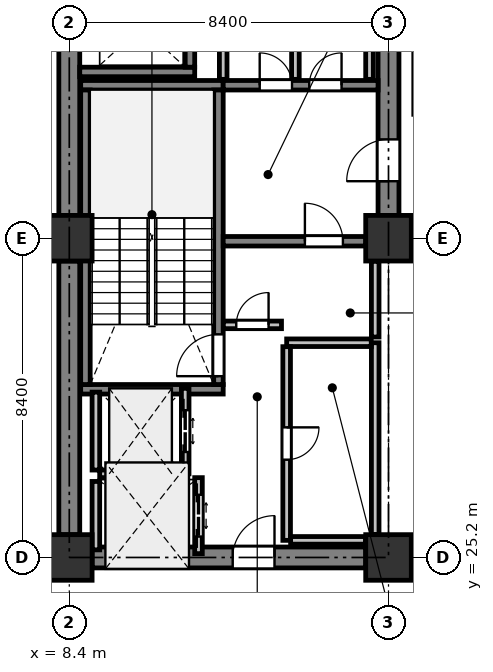
"""IFC4 building model, lengths in metres.
Left out: names, types, materials, properties, quantities, classifications, styles, units other than length and angle.
Written with IfcOpenShell. Run it as: python <this file> out.ifc"""

import sys

from ifc_helpers import new_model, si_unit, direction, frame, frame_2d, origin, origin_2d, place, context, subcontext, project, spatial, rectangle, extrude, element, fill, save


model = new_model("IFC4")
c1 = context("Model", 3, precision=1e-05, world=origin(), true_north=direction((0.0, 1.0)))
c2 = subcontext(c1, "Body", "Model", "MODEL_VIEW")
j1 = project(units=[si_unit("LENGTHUNIT", "METRE"), si_unit("PLANEANGLEUNIT", "RADIAN")], contexts=[c1])
p1 = place(None, origin())
s1 = spatial("IfcSite", under=j1, at=p1, CompositionType="ELEMENT")
p2 = place(p1, origin())
s2 = spatial("IfcBuilding", under=s1, at=p2, CompositionType="ELEMENT")
p3 = place(p2, frame((0.0, 0.0, 129.5)))
s3 = spatial("IfcBuildingStorey", under=s2, at=p3, CompositionType="ELEMENT", Elevation=129.5)
for number, where, z_axis, x_axis in (
    (1, (8.4, 25.2, 0.0), (0.0, 0.0, 1.0), (1.0, 0.0, 0.0)),
    (2, (8.4, 33.6, 0.0), (0.0, 0.0, 1.0), (1.0, 0.0, 0.0)),
    (3, (16.8, 25.2, 0.0), (0.0, 0.0, 1.0), (1.0, 0.0, 0.0)),
    (4, (16.8, 33.6, 0.0), (0.0, 0.0, 1.0), (1.0, 0.0, 0.0)),
):
    element("IfcColumn", number, at=place(p3, frame(where, z_axis=z_axis, x_axis=x_axis)), inside=s3, PredefinedType="COLUMN", context=c2, shape_type="SweptSolid", body=[
        extrude(rectangle(XDim=1.2, YDim=1.2, at=origin_2d()), origin(), (0.0, 0.0, 1.0), 4.1),
    ])
for number, where, z_axis, x_axis in (
    (5, (8.4, 25.8, 0.0), (0.0, 0.0, 1.0), (0.0, 1.0, 0.0)),
    (6, (8.4, 34.2, 0.0), (0.0, 0.0, 1.0), (0.0, 1.0, 0.0)),
):
    element("IfcWall", number, at=place(p3, frame(where, z_axis=z_axis, x_axis=x_axis)), inside=s3, PredefinedType="SHEAR", context=c2, shape_type="SweptSolid", body=[
        extrude(rectangle(XDim=7.2, YDim=0.55, at=frame_2d((3.6, 0.0))), origin(), (0.0, 0.0, 1.0), 3.825),
    ])
p4 = place(p3, frame((16.8, 34.2, 0.0), z_axis=(0.0, 0.0, 1.0), x_axis=(0.0, 1.0, 0.0)))
e7 = element("IfcWall", 7, at=p4, inside=s3, PredefinedType="SHEAR", context=c2, shape_type="SweptSolid", body=[
    extrude(rectangle(XDim=7.2, YDim=0.55, at=frame_2d((3.6, 0.0))), origin(), (0.0, 0.0, 1.0), 3.825),
])
p5 = place(p4, frame((0.9, 0.0, 0.0)))
e8 = element("IfcOpeningElement", 8, at=p5, cuts=e7, PredefinedType="OPENING", context=c2, shape_type="SweptSolid", body=[
    extrude(rectangle(XDim=1.1, YDim=2.15, at=frame_2d((0.55, 1.075))), frame((0.0, 0.285, 0.0), z_axis=(0.0, -1.0, 0.0), x_axis=(1.0, 0.0, 0.0)), (0.0, 0.0, 1.0), 0.57),
])
p6 = place(p3, frame((9.0, 25.2, 0.0), z_axis=(0.0, 0.0, 1.0), x_axis=(1.0, 0.0, 0.0)))
e9 = element("IfcWall", 9, at=p6, inside=s3, PredefinedType="SHEAR", context=c2, shape_type="SweptSolid", body=[
    extrude(rectangle(XDim=7.2, YDim=0.55, at=frame_2d((3.6, 0.0))), origin(), (0.0, 0.0, 1.0), 3.825),
])
p7 = place(p6, frame((3.7, 0.0, 0.0)))
e10 = element("IfcOpeningElement", 10, at=p7, cuts=e9, PredefinedType="OPENING", context=c2, shape_type="SweptSolid", body=[
    extrude(rectangle(XDim=1.1, YDim=2.15, at=frame_2d((0.55, 1.075))), frame((0.0, 0.285, 0.0), z_axis=(0.0, -1.0, 0.0), x_axis=(1.0, 0.0, 0.0)), (0.0, 0.0, 1.0), 0.57),
])
for number, where, z_axis, x_axis in (
    (11, (12.45, 29.625, 0.0), (0.0, 0.0, 1.0), (-1.0, 0.0, 0.0)),
    (12, (12.45, 37.625, 0.0), (0.0, 0.0, 1.0), (-1.0, 0.0, 0.0)),
):
    element("IfcWall", number, at=place(p3, frame(where, z_axis=z_axis, x_axis=x_axis)), inside=s3, PredefinedType="SHEAR", context=c2, shape_type="SweptSolid", body=[
        extrude(rectangle(XDim=3.75, YDim=0.25, at=frame_2d((1.875, 0.0))), origin(), (0.0, 0.0, 1.0), 3.825),
    ])
p8 = place(p3, frame((12.325, 29.75, 0.0), z_axis=(0.0, 0.0, 1.0), x_axis=(0.0, 1.0, 0.0)))
e13 = element("IfcWall", 13, at=p8, inside=s3, PredefinedType="SHEAR", context=c2, shape_type="SweptSolid", body=[
    extrude(rectangle(XDim=7.75, YDim=0.25, at=frame_2d((3.875, 0.0))), origin(), (0.0, 0.0, 1.0), 3.825),
])
p9 = place(p8, frame((0.22, 0.0, 0.0)))
e14 = element("IfcOpeningElement", 14, at=p9, cuts=e13, PredefinedType="OPENING", context=c2, shape_type="SweptSolid", body=[
    extrude(rectangle(XDim=1.1, YDim=2.15, at=frame_2d((0.55, 1.075))), frame((0.0, 0.135, 0.0), z_axis=(0.0, -1.0, 0.0), x_axis=(1.0, 0.0, 0.0)), (0.0, 0.0, 1.0), 0.27),
])
p10 = place(p3, frame((8.825, 29.75, 0.0), z_axis=(0.0, 0.0, 1.0), x_axis=(0.0, 1.0, 0.0)))
e15 = element("IfcWall", 15, at=p10, inside=s3, PredefinedType="SHEAR", context=c2, shape_type="SweptSolid", body=[
    extrude(rectangle(XDim=7.75, YDim=0.25, at=frame_2d((3.875, 0.0))), origin(), (0.0, 0.0, 1.0), 3.825),
])
p11 = place(p3, frame((8.675, 37.975, 0.0), z_axis=(0.0, 0.0, 1.0), x_axis=(1.0, 0.0, 0.0)))
e16 = element("IfcWall", 16, at=p11, inside=s3, PredefinedType="SHEAR", context=c2, shape_type="SweptSolid", body=[
    extrude(rectangle(XDim=3.025, YDim=0.25, at=frame_2d((1.512, 0.0))), origin(), (0.0, 0.0, 1.0), 3.825),
])
p12 = place(p3, frame((11.575, 38.1, 0.0), z_axis=(0.0, 0.0, 1.0), x_axis=(0.0, 1.0, 0.0)))
e17 = element("IfcWall", 17, at=p12, inside=s3, PredefinedType="SHEAR", context=c2, shape_type="SweptSolid", body=[
    extrude(rectangle(XDim=2.55, YDim=0.25, at=frame_2d((1.275, 0.0))), origin(), (0.0, 0.0, 1.0), 3.825),
])
p13 = place(p3, frame((12.45, 33.52, 0.0), z_axis=(0.0, 0.0, 1.0), x_axis=(1.0, 0.0, 0.0)))
e18 = element("IfcWall", 18, at=p13, inside=s3, PredefinedType="SHEAR", context=c2, shape_type="SweptSolid", body=[
    extrude(rectangle(XDim=3.75, YDim=0.25, at=frame_2d((1.875, 0.0))), origin(), (0.0, 0.0, 1.0), 3.825),
])
p14 = place(p13, frame((2.15, 0.0, 0.0)))
e19 = element("IfcOpeningElement", 19, at=p14, cuts=e18, PredefinedType="OPENING", context=c2, shape_type="SweptSolid", body=[
    extrude(rectangle(XDim=1.0, YDim=2.15, at=frame_2d((0.5, 1.075))), frame((0.0, 0.135, 0.0), z_axis=(0.0, -1.0, 0.0), x_axis=(1.0, 0.0, 0.0)), (0.0, 0.0, 1.0), 0.27),
])
p15 = place(p3, frame((12.45, 37.625, 0.0), z_axis=(0.0, 0.0, 1.0), x_axis=(1.0, 0.0, 0.0)))
e20 = element("IfcWall", 20, at=p15, inside=s3, PredefinedType="SHEAR", context=c2, shape_type="SweptSolid", body=[
    extrude(rectangle(XDim=4.075, YDim=0.25, at=frame_2d((2.038, 0.0))), origin(), (0.0, 0.0, 1.0), 3.825),
])
p16 = place(p15, frame((0.96, 0.0, 0.0)))
e21 = element("IfcOpeningElement", 21, at=p16, cuts=e20, PredefinedType="OPENING", context=c2, shape_type="SweptSolid", body=[
    extrude(rectangle(XDim=0.85, YDim=2.15, at=frame_2d((0.425, 1.075))), frame((0.0, 0.135, 0.0), z_axis=(0.0, -1.0, 0.0), x_axis=(1.0, 0.0, 0.0)), (0.0, 0.0, 1.0), 0.27),
])
p17 = place(p15, frame((2.264, 0.0, 0.0)))
e22 = element("IfcOpeningElement", 22, at=p17, cuts=e20, PredefinedType="OPENING", context=c2, shape_type="SweptSolid", body=[
    extrude(rectangle(XDim=0.85, YDim=2.15, at=frame_2d((0.425, 1.075))), frame((0.0, 0.135, 0.0), z_axis=(0.0, -1.0, 0.0), x_axis=(1.0, 0.0, 0.0)), (0.0, 0.0, 1.0), 0.27),
])
p18 = place(p3, frame((11.45, 27.4, 0.0), z_axis=(0.0, 0.0, 1.0), x_axis=(0.0, 1.0, 0.0)))
e23 = element("IfcWall", 23, at=p18, inside=s3, PredefinedType="PARTITIONING", context=c2, shape_type="SweptSolid", body=[
    extrude(rectangle(XDim=2.25, YDim=0.2, at=frame_2d((1.125, 0.0))), origin(), (0.0, 0.0, 1.0), 3.825),
])
p19 = place(p18, frame((0.575, 0.0, 0.0)))
e24 = element("IfcOpeningElement", 24, at=p19, cuts=e23, PredefinedType="OPENING", context=c2, shape_type="SweptSolid", body=[
    extrude(rectangle(XDim=1.1, YDim=2.2, at=frame_2d((0.55, 1.1))), frame((0.0, 0.11, 0.0), z_axis=(0.0, -1.0, 0.0), x_axis=(1.0, 0.0, 0.0)), (0.0, 0.0, 1.0), 0.22),
])
p20 = place(p3, frame((9.1, 27.5, 0.0), z_axis=(0.0, 0.0, 1.0), x_axis=(0.0, 1.0, 0.0)))
e25 = element("IfcWall", 25, at=p20, inside=s3, PredefinedType="PARTITIONING", context=c2, shape_type="SweptSolid", body=[
    extrude(rectangle(XDim=2.05, YDim=0.2, at=frame_2d((1.025, 0.0))), origin(), (0.0, 0.0, 1.0), 3.825),
])
p21 = place(p3, frame((9.2, 27.4, 0.0), z_axis=(0.0, 0.0, 1.0), x_axis=(1.0, 0.0, 0.0)))
e26 = element("IfcWall", 26, at=p21, inside=s3, PredefinedType="PARTITIONING", context=c2, shape_type="SweptSolid", body=[
    extrude(rectangle(XDim=2.15, YDim=0.2, at=frame_2d((1.075, 0.0))), origin(), (0.0, 0.0, 1.0), 3.825),
])
p22 = place(p3, frame((11.8, 25.3, 0.0), z_axis=(0.0, 0.0, 1.0), x_axis=(0.0, 1.0, 0.0)))
e27 = element("IfcWall", 27, at=p22, inside=s3, PredefinedType="PARTITIONING", context=c2, shape_type="SweptSolid", body=[
    extrude(rectangle(XDim=2.0, YDim=0.2, at=frame_2d((1.0, 0.0))), origin(), (0.0, 0.0, 1.0), 3.825),
])
p23 = place(p22, frame((0.45, 0.0, 0.0)))
e28 = element("IfcOpeningElement", 28, at=p23, cuts=e27, PredefinedType="OPENING", context=c2, shape_type="SweptSolid", body=[
    extrude(rectangle(XDim=1.1, YDim=2.2, at=frame_2d((0.55, 1.1))), frame((0.0, 0.11, 0.0), z_axis=(0.0, -1.0, 0.0), x_axis=(1.0, 0.0, 0.0)), (0.0, 0.0, 1.0), 0.22),
])
p24 = place(p3, frame((9.1, 25.4, 0.0), z_axis=(0.0, 0.0, 1.0), x_axis=(0.0, 1.0, 0.0)))
e29 = element("IfcWall", 29, at=p24, inside=s3, PredefinedType="PARTITIONING", context=c2, shape_type="SweptSolid", body=[
    extrude(rectangle(XDim=1.8, YDim=0.2, at=frame_2d((0.9, 0.0))), origin(), (0.0, 0.0, 1.0), 3.825),
])
p25 = place(p3, frame((16.45, 25.805, 0.0), z_axis=(0.0, 0.0, 1.0), x_axis=(0.0, 1.0, 0.0)))
e30 = element("IfcWall", 30, at=p25, inside=s3, PredefinedType="PARTITIONING", context=c2, shape_type="SweptSolid", body=[
    extrude(rectangle(XDim=5.045, YDim=0.2, at=frame_2d((2.522, 0.0))), origin(), (0.0, 0.0, 1.0), 3.825),
])
p26 = place(p3, frame((16.346, 30.85, 0.0), z_axis=(0.0, 0.0, 1.0), x_axis=(-1.0, 0.0, 0.0)))
e31 = element("IfcWall", 31, at=p26, inside=s3, PredefinedType="PARTITIONING", context=c2, shape_type="SweptSolid", body=[
    extrude(rectangle(XDim=2.226, YDim=0.2, at=frame_2d((1.113, 0.0))), origin(), (0.0, 0.0, 1.0), 3.825),
])
p27 = place(p3, frame((14.12, 30.746, 0.0), z_axis=(0.0, 0.0, 1.0), x_axis=(0.0, -1.0, 0.0)))
e32 = element("IfcWall", 32, at=p27, inside=s3, PredefinedType="PARTITIONING", context=c2, shape_type="SweptSolid", body=[
    extrude(rectangle(XDim=5.096, YDim=0.2, at=frame_2d((2.548, 0.0))), origin(), (0.0, 0.0, 1.0), 3.825),
])
p28 = place(p27, frame((2.123, 0.0, 0.0)))
e33 = element("IfcOpeningElement", 33, at=p28, cuts=e32, PredefinedType="OPENING", context=c2, shape_type="SweptSolid", body=[
    extrude(rectangle(XDim=0.85, YDim=2.15, at=frame_2d((0.425, 1.075))), frame((0.0, 0.11, 0.0), z_axis=(0.0, -1.0, 0.0), x_axis=(1.0, 0.0, 0.0)), (0.0, 0.0, 1.0), 0.22),
])
p29 = place(p3, frame((14.224, 25.65, 0.0), z_axis=(0.0, 0.0, 1.0), x_axis=(1.0, 0.0, 0.0)))
e34 = element("IfcWall", 34, at=p29, inside=s3, PredefinedType="PARTITIONING", context=c2, shape_type="SweptSolid", body=[
    extrude(rectangle(XDim=1.971, YDim=0.2, at=frame_2d((0.985, 0.0))), origin(), (0.0, 0.0, 1.0), 3.825),
])
p30 = place(p3, frame((12.454, 31.32, 0.0), z_axis=(0.0, 0.0, 1.0), x_axis=(0.999999949061, -0.000319182876, 0.0)))
e35 = element("IfcWall", 35, at=p30, inside=s3, PredefinedType="PARTITIONING", context=c2, shape_type="SweptSolid", body=[
    extrude(rectangle(XDim=1.53, YDim=0.2, at=frame_2d((0.765, 0.0))), origin(), (0.0, 0.0, 1.0), 3.825),
])
p31 = place(p30, frame((0.34, 0.0, 0.0)))
e36 = element("IfcOpeningElement", 36, at=p31, cuts=e35, PredefinedType="OPENING", context=c2, shape_type="SweptSolid", body=[
    extrude(rectangle(XDim=0.85, YDim=2.15, at=frame_2d((0.425, 1.075))), frame((0.0, 0.11, 0.0), z_axis=(0.0, -1.0, 0.0), x_axis=(1.0, 0.0, 0.0)), (0.0, 0.0, 1.0), 0.22),
])
p32 = place(p3, frame((16.45, 31.0, 0.0), z_axis=(0.0, 0.0, 1.0), x_axis=(0.0, 1.0, 0.0)))
e37 = element("IfcWall", 37, at=p32, inside=s3, PredefinedType="PARTITIONING", context=c2, shape_type="SweptSolid", body=[
    extrude(rectangle(XDim=1.995, YDim=0.2, at=frame_2d((0.998, 0.0))), origin(), (0.0, 0.0, 1.0), 3.825),
])
p33 = place(p3, frame((14.35, 37.78, 0.0), z_axis=(0.0, 0.0, 1.0), x_axis=(0.0, 1.0, 0.0)))
e38 = element("IfcWall", 38, at=p33, inside=s3, PredefinedType="PARTITIONING", context=c2, shape_type="SweptSolid", body=[
    extrude(rectangle(XDim=1.67, YDim=0.2, at=frame_2d((0.835, 0.0))), origin(), (0.0, 0.0, 1.0), 2.725),
])
p34 = place(p3, frame((12.45, 39.346, 0.0), z_axis=(0.0, 0.0, 1.0), x_axis=(0.0, -1.0, 0.0)))
e39 = element("IfcWall", 39, at=p34, inside=s3, PredefinedType="PARTITIONING", context=c2, shape_type="SweptSolid", body=[
    extrude(rectangle(XDim=1.566, YDim=0.2, at=frame_2d((0.783, 0.0))), origin(), (0.0, 0.0, 1.0), 2.725),
])
p35 = place(p3, frame((16.3, 37.78, 0.0), z_axis=(0.0, 0.0, 1.0), x_axis=(0.0, 1.0, 0.0)))
e40 = element("IfcWall", 40, at=p35, inside=s3, PredefinedType="PARTITIONING", context=c2, shape_type="SweptSolid", body=[
    extrude(rectangle(XDim=2.866, YDim=0.2, at=frame_2d((1.433, 0.0))), origin(), (0.0, 0.0, 1.0), 2.725),
])
p36 = place(p5, origin())
e41 = element("IfcDoor", 41, at=p36, inside=s3, OperationType="SINGLE_SWING_LEFT", PredefinedType="DOOR", context=c2, shape_type="SweptSolid", body=[
    extrude(rectangle(XDim=1.1, YDim=2.15, at=frame_2d((0.55, 1.075))), frame((0.0, 0.025, 0.0), z_axis=(0.0, -1.0, 0.0), x_axis=(1.0, 0.0, 0.0)), (0.0, 0.0, 1.0), 0.05),
])
fill(e8, e41)
p37 = place(p7, origin())
e42 = element("IfcDoor", 42, at=p37, inside=s3, OperationType="SINGLE_SWING_RIGHT", PredefinedType="DOOR", context=c2, shape_type="SweptSolid", body=[
    extrude(rectangle(XDim=1.1, YDim=2.15, at=frame_2d((0.55, 1.075))), frame((0.0, 0.025, 0.0), z_axis=(0.0, -1.0, 0.0), x_axis=(1.0, 0.0, 0.0)), (0.0, 0.0, 1.0), 0.05),
])
fill(e10, e42)
p38 = place(p9, origin())
e43 = element("IfcDoor", 43, at=p38, inside=s3, OperationType="SINGLE_SWING_LEFT", PredefinedType="DOOR", context=c2, shape_type="SweptSolid", body=[
    extrude(rectangle(XDim=1.1, YDim=2.15, at=frame_2d((0.55, 1.075))), frame((0.0, 0.025, 0.0), z_axis=(0.0, -1.0, 0.0), x_axis=(1.0, 0.0, 0.0)), (0.0, 0.0, 1.0), 0.05),
])
fill(e14, e43)
p39 = place(p14, origin())
e44 = element("IfcDoor", 44, at=p39, inside=s3, OperationType="SINGLE_SWING_LEFT", PredefinedType="DOOR", context=c2, shape_type="SweptSolid", body=[
    extrude(rectangle(XDim=1.0, YDim=2.15, at=frame_2d((0.5, 1.075))), frame((0.0, 0.025, 0.0), z_axis=(0.0, -1.0, 0.0), x_axis=(1.0, 0.0, 0.0)), (0.0, 0.0, 1.0), 0.05),
])
fill(e19, e44)
p40 = place(p19, origin())
e45 = element("IfcDoor", 45, at=p40, inside=s3, OperationType="DOUBLE_DOOR_SLIDING", PredefinedType="DOOR", context=c2, shape_type="SweptSolid", body=[
    extrude(rectangle(XDim=1.1, YDim=2.2, at=frame_2d((0.55, 1.1))), frame((0.0, 0.025, 0.0), z_axis=(0.0, -1.0, 0.0), x_axis=(1.0, 0.0, 0.0)), (0.0, 0.0, 1.0), 0.05),
])
fill(e24, e45)
p41 = place(p23, origin())
e46 = element("IfcDoor", 46, at=p41, inside=s3, OperationType="DOUBLE_DOOR_SLIDING", PredefinedType="DOOR", context=c2, shape_type="SweptSolid", body=[
    extrude(rectangle(XDim=1.1, YDim=2.2, at=frame_2d((0.55, 1.1))), frame((0.0, 0.025, 0.0), z_axis=(0.0, -1.0, 0.0), x_axis=(1.0, 0.0, 0.0)), (0.0, 0.0, 1.0), 0.05),
])
fill(e28, e46)
p42 = place(p28, origin())
e47 = element("IfcDoor", 47, at=p42, inside=s3, OperationType="SINGLE_SWING_LEFT", PredefinedType="DOOR", context=c2, shape_type="SweptSolid", body=[
    extrude(rectangle(XDim=0.85, YDim=2.15, at=frame_2d((0.425, 1.075))), frame((0.0, 0.025, 0.0), z_axis=(0.0, -1.0, 0.0), x_axis=(1.0, 0.0, 0.0)), (0.0, 0.0, 1.0), 0.05),
])
fill(e33, e47)
p43 = place(p31, origin())
e48 = element("IfcDoor", 48, at=p43, inside=s3, OperationType="SINGLE_SWING_RIGHT", PredefinedType="DOOR", context=c2, shape_type="SweptSolid", body=[
    extrude(rectangle(XDim=0.85, YDim=2.15, at=frame_2d((0.425, 1.075))), frame((0.0, 0.025, 0.0), z_axis=(0.0, -1.0, 0.0), x_axis=(1.0, 0.0, 0.0)), (0.0, 0.0, 1.0), 0.05),
])
fill(e36, e48)
p44 = place(p16, origin())
e49 = element("IfcDoor", 49, at=p44, inside=s3, OperationType="SINGLE_SWING_LEFT", PredefinedType="DOOR", context=c2, shape_type="SweptSolid", body=[
    extrude(rectangle(XDim=0.85, YDim=2.15, at=frame_2d((0.425, 1.075))), frame((0.0, 0.025, 0.0), z_axis=(0.0, -1.0, 0.0), x_axis=(1.0, 0.0, 0.0)), (0.0, 0.0, 1.0), 0.05),
])
fill(e21, e49)
p45 = place(p17, origin())
e50 = element("IfcDoor", 50, at=p45, inside=s3, OperationType="SINGLE_SWING_RIGHT", PredefinedType="DOOR", context=c2, shape_type="SweptSolid", body=[
    extrude(rectangle(XDim=0.85, YDim=2.15, at=frame_2d((0.425, 1.075))), frame((0.0, 0.025, 0.0), z_axis=(0.0, -1.0, 0.0), x_axis=(1.0, 0.0, 0.0)), (0.0, 0.0, 1.0), 0.05),
])
fill(e22, e50)
save(model, sys.argv[1])
